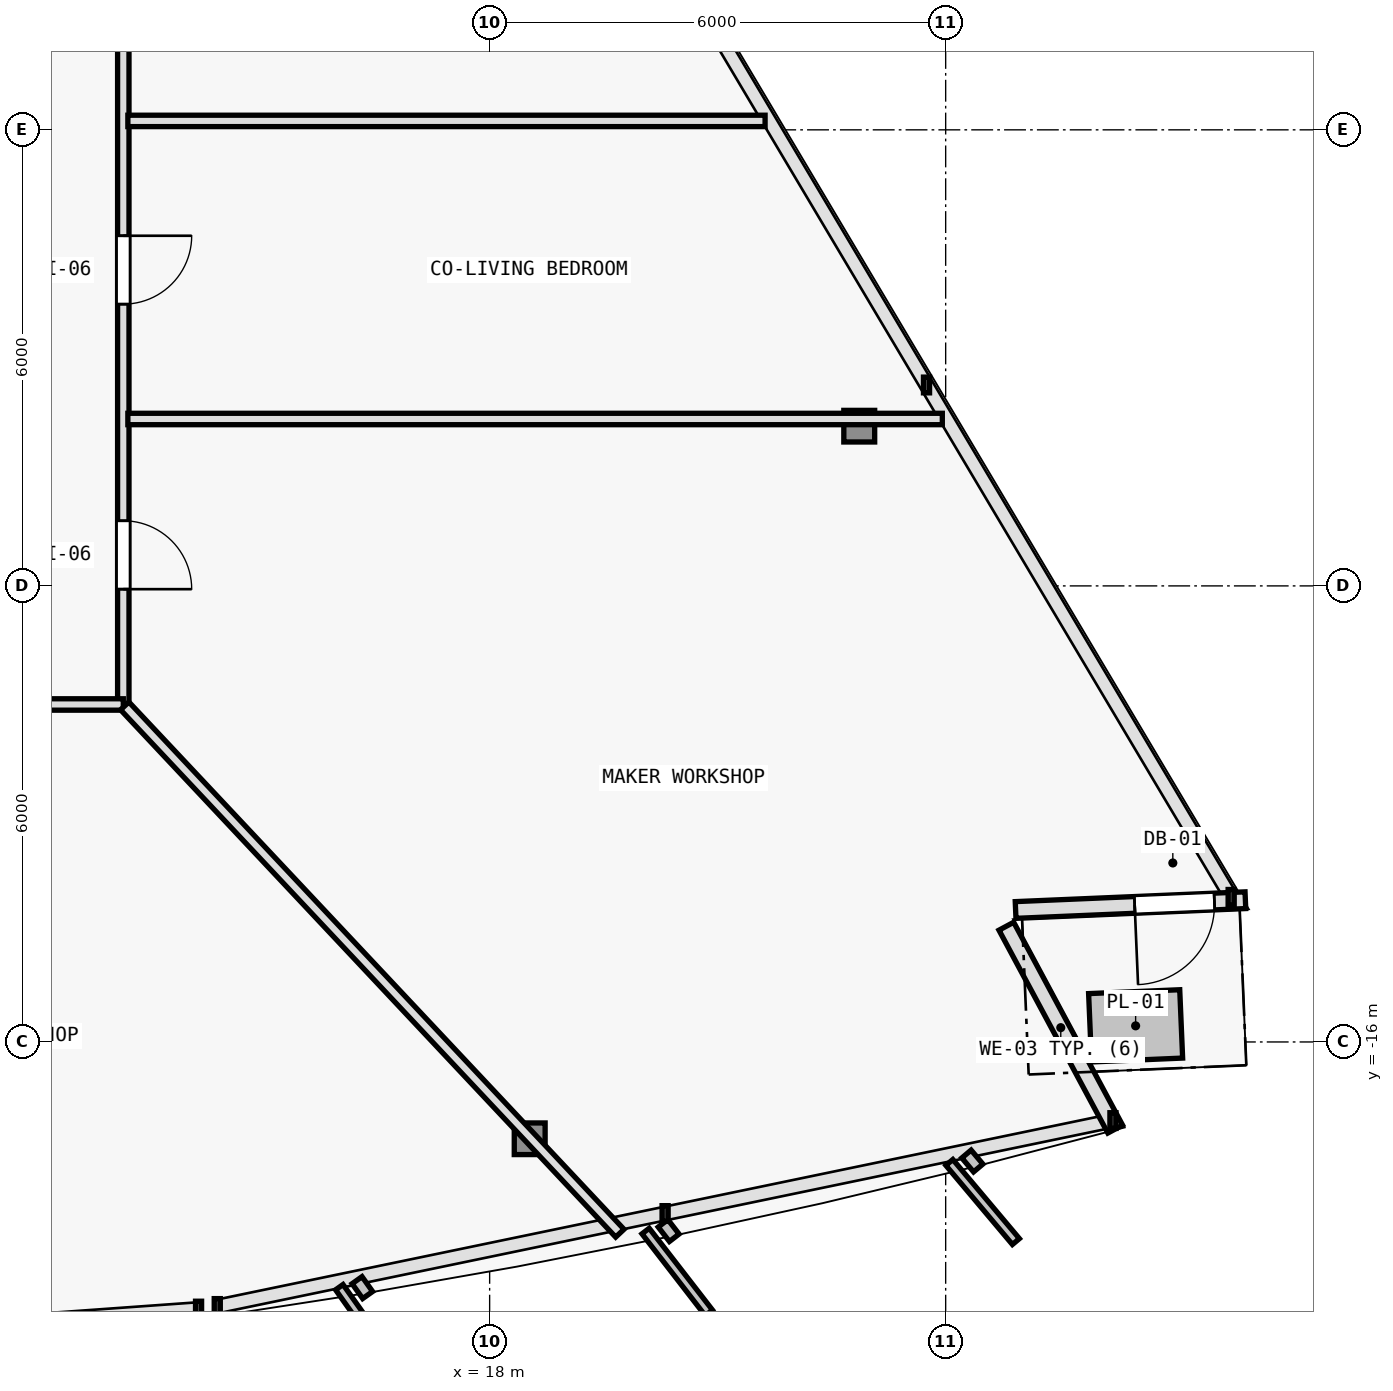
"""IFC4 building model, lengths in metres.
Left out: names, types, materials, properties, quantities, classifications, styles, units other than length and angle.
Written with IfcOpenShell. Run it as: python <this file> out.ifc"""

import sys

from ifc_helpers import new_model, si_unit, direction, frame, frame_2d, origin, origin_2d, place, context, subcontext, project, spatial, rectangle, i_section, extrude, element, fill, save


model = new_model("IFC4")
c1 = context("Model", 3, precision=1e-05, world=origin(), true_north=direction((0.0, 1.0)))
c2 = subcontext(c1, "Body", "Model", "MODEL_VIEW")
j1 = project(units=[si_unit("LENGTHUNIT", "METRE"), si_unit("PLANEANGLEUNIT", "RADIAN")], contexts=[c1])
p1 = place(None, origin())
s1 = spatial("IfcSite", under=j1, at=p1, CompositionType="ELEMENT")
p2 = place(p1, origin())
s2 = spatial("IfcBuilding", under=s1, at=p2, CompositionType="ELEMENT")
p3 = place(p2, frame((0.0, 0.0, 118.5)))
s3 = spatial("IfcBuildingStorey", under=s2, at=p3, CompositionType="ELEMENT", Elevation=118.5)
p4 = place(p3, frame((18.527, -17.274, 0.006), z_axis=(-0.020664238418, 0.033511412961, 0.999224686671), x_axis=(-0.851183725565, -0.524867855115, 0.0)))
e1 = element("IfcColumn", 1, at=p4, inside=s3, PredefinedType="COLUMN", context=c2, shape_type="SweptSolid", body=[
    extrude(i_section(OverallWidth=0.406, OverallDepth=0.416, WebThickness=0.019, FlangeThickness=0.031, FilletRadius=0.015, at=origin_2d()), origin(), (0.0, 0.0, 1.0), 3.592),
])
p5 = place(p3, frame((22.863, -7.899, 0.006), z_axis=(-0.026107436898, 0.021620221181, 0.999425318758), x_axis=(-0.637813971185, -0.770190455771, 0.0)))
e2 = element("IfcColumn", 2, at=p5, inside=s3, PredefinedType="COLUMN", context=c2, shape_type="SweptSolid", body=[
    extrude(i_section(OverallWidth=0.406, OverallDepth=0.416, WebThickness=0.019, FlangeThickness=0.031, FilletRadius=0.015, at=origin_2d()), origin(), (0.0, 0.0, 1.0), 3.591),
])
p6 = place(p3, frame((24.798, -14.477, 0.0), z_axis=(0.0, 0.0, 1.0), x_axis=(0.472820757697, -0.881158629925, 0.0)))
e3 = element("IfcWall", 3, at=p6, inside=s3, PredefinedType="SOLIDWALL", context=c2, shape_type="SweptSolid", body=[
    extrude(rectangle(XDim=3.029, YDim=0.22, at=frame_2d((1.514, 0.0))), origin(), (0.0, 0.0, 1.0), 3.35),
])
p7 = place(p3, frame((27.943, -14.135, 0.0), z_axis=(0.0, 0.0, 1.0), x_axis=(-0.999095621918, -0.042519857284, 0.0)))
e4 = element("IfcWall", 4, at=p7, inside=s3, PredefinedType="SOLIDWALL", context=c2, shape_type="SweptSolid", body=[
    extrude(rectangle(XDim=3.026, YDim=0.22, at=frame_2d((1.513, 0.0))), origin(), (0.0, 0.0, 1.0), 3.35),
])
p8 = place(p7, frame((0.408, 0.0, 0.0)))
e5 = element("IfcOpeningElement", 5, at=p8, cuts=e4, PredefinedType="OPENING", context=c2, shape_type="SweptSolid", body=[
    extrude(rectangle(XDim=1.05, YDim=2.15, at=frame_2d((0.525, 1.075))), frame((0.0, 0.12, 0.0), z_axis=(0.0, -1.0, 0.0), x_axis=(1.0, 0.0, 0.0)), (0.0, 0.0, 1.0), 0.24),
])
p9 = place(p3, frame((13.18, 8.444, 0.0), z_axis=(0.0, 0.0, 1.0), x_axis=(0.0, -1.0, 0.0)))
e6 = element("IfcWall", 6, at=p9, inside=s3, PredefinedType="PARTITIONING", context=c2, shape_type="SweptSolid", body=[
    extrude(rectangle(XDim=20.004, YDim=0.15, at=frame_2d((10.002, 0.0))), origin(), (0.0, 0.0, 1.0), 2.705),
])
p10 = place(p9, frame((17.587, 0.0, 0.0)))
e7 = element("IfcOpeningElement", 7, at=p10, cuts=e6, PredefinedType="OPENING", context=c2, shape_type="SweptSolid", body=[
    extrude(rectangle(XDim=0.9, YDim=2.1, at=frame_2d((0.45, 1.05))), frame((0.0, 0.085, 0.0), z_axis=(0.0, -1.0, 0.0), x_axis=(1.0, 0.0, 0.0)), (0.0, 0.0, 1.0), 0.17),
])
p11 = place(p9, frame((13.837, 0.0, 0.0)))
e8 = element("IfcOpeningElement", 8, at=p11, cuts=e6, PredefinedType="OPENING", context=c2, shape_type="SweptSolid", body=[
    extrude(rectangle(XDim=0.9, YDim=2.1, at=frame_2d((0.45, 1.05))), frame((0.0, 0.085, 0.0), z_axis=(0.0, -1.0, 0.0), x_axis=(1.0, 0.0, 0.0)), (0.0, 0.0, 1.0), 0.17),
])
p12 = place(p9, frame((8.396, 0.0, 0.0)))
e9 = element("IfcOpeningElement", 9, at=p12, cuts=e6, PredefinedType="OPENING", context=c2, shape_type="SweptSolid", body=[
    extrude(rectangle(XDim=0.9, YDim=2.1, at=frame_2d((0.45, 1.05))), frame((0.0, 0.085, 0.0), z_axis=(0.0, -1.0, 0.0), x_axis=(1.0, 0.0, 0.0)), (0.0, 0.0, 1.0), 0.17),
])
p13 = place(p9, frame((3.599, 0.0, 0.0)))
e10 = element("IfcOpeningElement", 10, at=p13, cuts=e6, PredefinedType="OPENING", context=c2, shape_type="SweptSolid", body=[
    extrude(rectangle(XDim=0.9, YDim=2.1, at=frame_2d((0.45, 1.05))), frame((0.0, 0.085, 0.0), z_axis=(0.0, -1.0, 0.0), x_axis=(1.0, 0.0, 0.0)), (0.0, 0.0, 1.0), 0.17),
])
p14 = place(p9, frame((1.005, 0.0, 0.0)))
e11 = element("IfcOpeningElement", 11, at=p14, cuts=e6, PredefinedType="OPENING", context=c2, shape_type="SweptSolid", body=[
    extrude(rectangle(XDim=0.9, YDim=2.1, at=frame_2d((0.45, 1.05))), frame((0.0, 0.085, 0.0), z_axis=(0.0, -1.0, 0.0), x_axis=(1.0, 0.0, 0.0)), (0.0, 0.0, 1.0), 0.17),
])
p15 = place(p3, frame((13.18, -11.56, 0.0), z_axis=(0.0, 0.0, 1.0), x_axis=(-1.0, 0.0, 0.0)))
e12 = element("IfcWall", 12, at=p15, inside=s3, PredefinedType="PARTITIONING", context=c2, shape_type="SweptSolid", body=[
    extrude(rectangle(XDim=23.04, YDim=0.15, at=frame_2d((11.52, 0.0))), origin(), (0.0, 0.0, 1.0), 2.725),
])
p16 = place(p15, frame((20.669, 0.0, 0.0)))
e13 = element("IfcOpeningElement", 13, at=p16, cuts=e12, PredefinedType="OPENING", context=c2, shape_type="SweptSolid", body=[
    extrude(rectangle(XDim=0.9, YDim=2.1, at=frame_2d((0.45, 1.05))), frame((0.0, 0.085, 0.0), z_axis=(0.0, -1.0, 0.0), x_axis=(1.0, 0.0, 0.0)), (0.0, 0.0, 1.0), 0.17),
])
p17 = place(p15, frame((12.73, 0.0, 0.0)))
e14 = element("IfcOpeningElement", 14, at=p17, cuts=e12, PredefinedType="OPENING", context=c2, shape_type="SweptSolid", body=[
    extrude(rectangle(XDim=0.9, YDim=2.1, at=frame_2d((0.45, 1.05))), frame((0.0, 0.085, 0.0), z_axis=(0.0, -1.0, 0.0), x_axis=(1.0, 0.0, 0.0)), (0.0, 0.0, 1.0), 0.17),
])
p18 = place(p15, frame((3.131, 0.0, 0.0)))
e15 = element("IfcOpeningElement", 15, at=p18, cuts=e12, PredefinedType="OPENING", context=c2, shape_type="SweptSolid", body=[
    extrude(rectangle(XDim=0.9, YDim=2.1, at=frame_2d((0.45, 1.05))), frame((0.0, 0.085, 0.0), z_axis=(0.0, -1.0, 0.0), x_axis=(1.0, 0.0, 0.0)), (0.0, 0.0, 1.0), 0.17),
])
p19 = place(p3, frame((13.199, -11.579, 0.0), z_axis=(0.0, 0.0, 1.0), x_axis=(0.684539988811, -0.728975310774, 0.0)))
e16 = element("IfcWall", 16, at=p19, inside=s3, PredefinedType="PARTITIONING", context=c2, shape_type="SweptSolid", body=[
    extrude(rectangle(XDim=9.516, YDim=0.15, at=frame_2d((4.758, 0.0))), origin(), (0.0, 0.0, 1.0), 2.775),
])
p20 = place(p3, frame((13.24, -3.883, 0.0), z_axis=(0.0, 0.0, 1.0), x_axis=(1.0, 0.0, 0.0)))
e17 = element("IfcWall", 17, at=p20, inside=s3, PredefinedType="PARTITIONING", context=c2, shape_type="SweptSolid", body=[
    extrude(rectangle(XDim=8.384, YDim=0.15, at=frame_2d((4.192, 0.0))), origin(), (0.0, 0.0, 1.0), 2.775),
])
p21 = place(p3, frame((13.24, -7.804, 0.0), z_axis=(0.0, 0.0, 1.0), x_axis=(1.0, 0.0, 0.0)))
e18 = element("IfcWall", 18, at=p21, inside=s3, PredefinedType="PARTITIONING", context=c2, shape_type="SweptSolid", body=[
    extrude(rectangle(XDim=10.716, YDim=0.15, at=frame_2d((5.358, 0.0))), origin(), (0.0, 0.0, 1.0), 2.705),
])
p22 = place(p8, origin())
e19 = element("IfcDoor", 19, at=p22, inside=s3, OperationType="SINGLE_SWING_RIGHT", PredefinedType="DOOR", context=c2, shape_type="SweptSolid", body=[
    extrude(rectangle(XDim=1.05, YDim=2.15, at=frame_2d((0.525, 1.075))), frame((0.0, 0.025, 0.0), z_axis=(0.0, -1.0, 0.0), x_axis=(1.0, 0.0, 0.0)), (0.0, 0.0, 1.0), 0.05),
])
fill(e5, e19)
p23 = place(p10, origin())
e20 = element("IfcDoor", 20, at=p23, inside=s3, OperationType="SINGLE_SWING_RIGHT", PredefinedType="DOOR", context=c2, shape_type="SweptSolid", body=[
    extrude(rectangle(XDim=0.9, YDim=2.1, at=frame_2d((0.45, 1.05))), frame((0.0, 0.025, 0.0), z_axis=(0.0, -1.0, 0.0), x_axis=(1.0, 0.0, 0.0)), (0.0, 0.0, 1.0), 0.05),
])
fill(e7, e20)
p24 = place(p11, origin())
e21 = element("IfcDoor", 21, at=p24, inside=s3, OperationType="SINGLE_SWING_LEFT", PredefinedType="DOOR", context=c2, shape_type="SweptSolid", body=[
    extrude(rectangle(XDim=0.9, YDim=2.1, at=frame_2d((0.45, 1.05))), frame((0.0, 0.025, 0.0), z_axis=(0.0, -1.0, 0.0), x_axis=(1.0, 0.0, 0.0)), (0.0, 0.0, 1.0), 0.05),
])
fill(e8, e21)
save(model, sys.argv[1])
